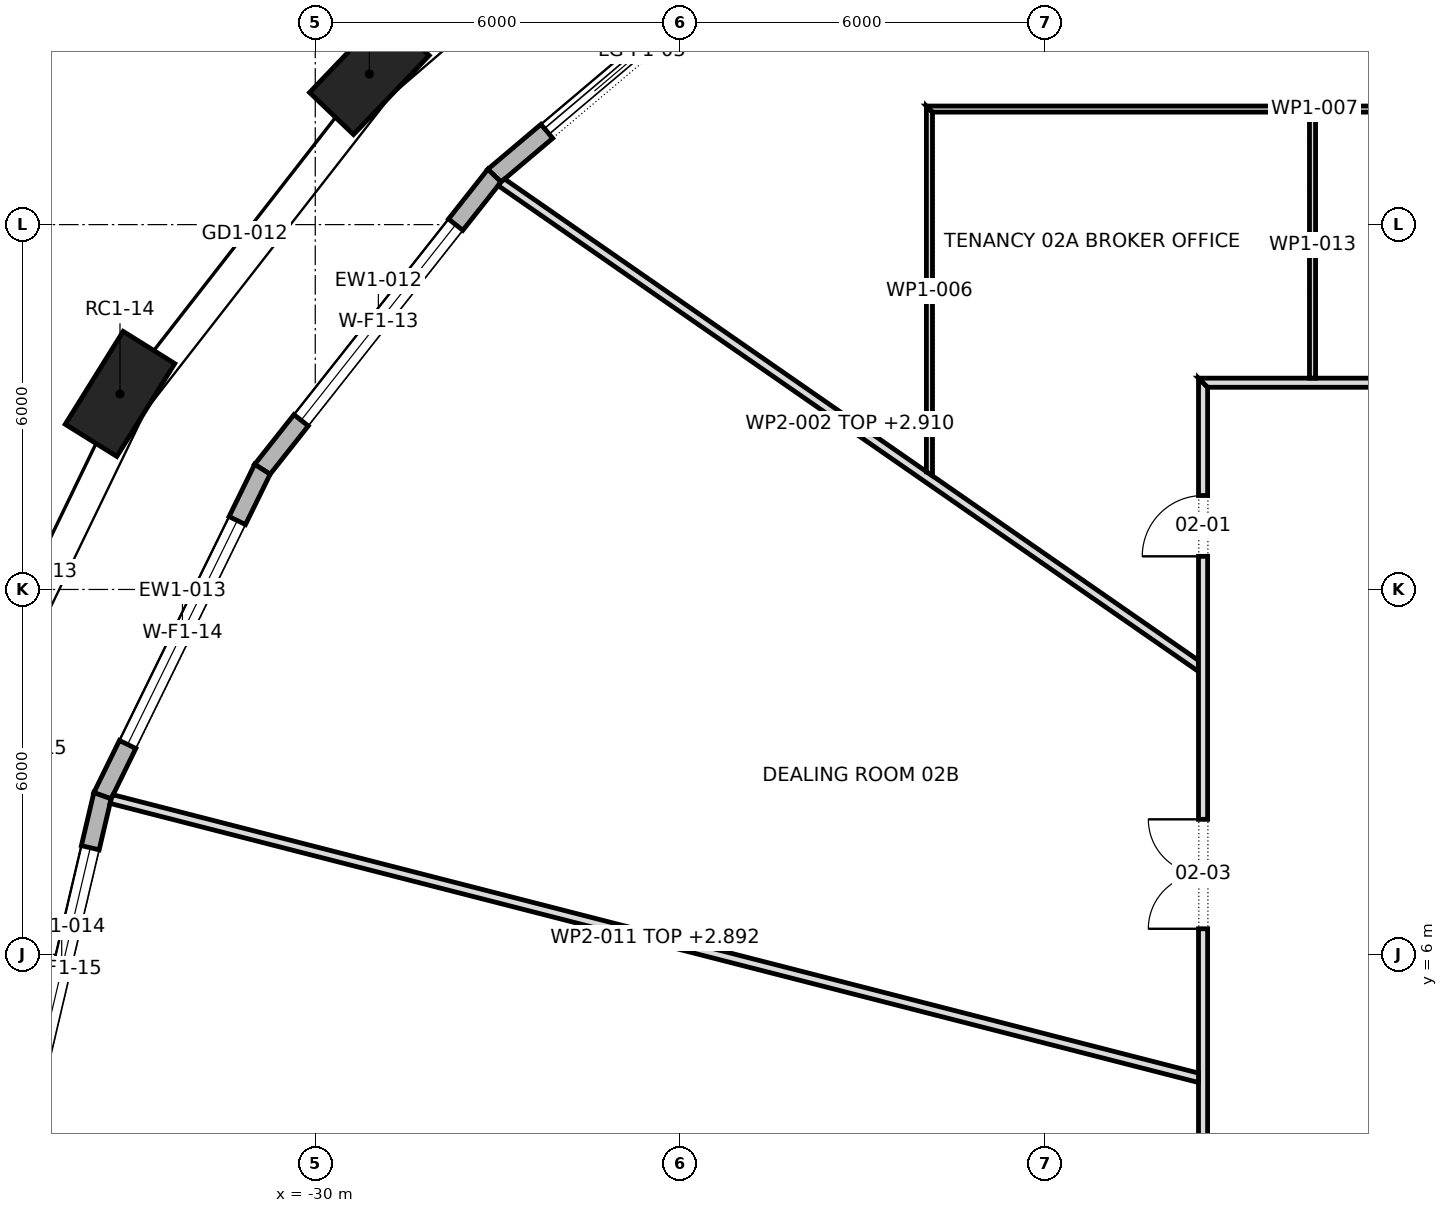
"""IFC4 building model, lengths in metres.
Left out: names, types, materials, properties, quantities, classifications, styles, units other than length and angle.
Written with IfcOpenShell. Run it as: python <this file> out.ifc"""

import sys

from ifc_helpers import new_model, si_unit, direction, frame, frame_2d, origin, origin_2d, place, context, subcontext, project, spatial, polyline, rectangle, outline, extrude, element, fill, save


model = new_model("IFC4")
c1 = context("Model", 3, precision=1e-05, world=origin(), true_north=direction((0.0, 1.0)))
c2 = subcontext(c1, "Body", "Model", "MODEL_VIEW")
j1 = project(units=[si_unit("LENGTHUNIT", "METRE"), si_unit("PLANEANGLEUNIT", "RADIAN")], contexts=[c1])
p1 = place(None, origin())
s1 = spatial("IfcSite", under=j1, at=p1, CompositionType="ELEMENT")
p2 = place(p1, origin())
s2 = spatial("IfcBuilding", under=s1, at=p2, CompositionType="ELEMENT")
p3 = place(p2, frame((0.0, 0.0, 36.1)))
s3 = spatial("IfcBuildingStorey", under=s2, at=p3, CompositionType="ELEMENT", Elevation=36.1)
for number, where, z_axis, x_axis in (
    (1, (-29.11, 20.477, 0.0), (0.0, 0.0, 1.0), (-0.692, -0.722, 0.0)),
    (2, (-33.211, 15.216, 0.0), (0.0, 0.0, 1.0), (-0.529, -0.849, 0.0)),
):
    element("IfcColumn", number, at=place(p3, frame(where, z_axis=z_axis, x_axis=x_axis)), inside=s3, PredefinedType="COLUMN", context=c2, shape_type="SweptSolid", body=[
        extrude(rectangle(XDim=1.8, YDim=1.0, at=origin_2d()), origin(), (0.0, 0.0, 1.0), 4.2),
    ])
p4 = place(p3, frame((-22.2, 22.911, 0.0), z_axis=(0.0, 0.0, 1.0), x_axis=(-0.763577077796, -0.645716691951, 0.0)))
e3 = element("IfcWall", 3, at=p4, inside=s3, PredefinedType="STANDARD", context=c2, shape_type="SweptSolid", body=[
    extrude(outline(polyline([(-0.014, -0.15), (6.372, -0.15), (6.342, 0.15), (0.014, 0.15), (-0.014, -0.15)])), origin(), (0.0, 0.0, 1.0), 3.9),
])
p5 = place(p4, frame((1.129, 0.0, 0.0)))
e4 = element("IfcOpeningElement", 4, at=p5, cuts=e3, PredefinedType="OPENING", context=c2, shape_type="SweptSolid", body=[
    extrude(rectangle(XDim=4.1, YDim=3.45, at=frame_2d((2.05, 1.725))), frame((0.0, 0.162, 0.0), z_axis=(0.0, -1.0, 0.0), x_axis=(1.0, 0.0, 0.0)), (0.0, 0.0, 1.0), 0.324),
])
p6 = place(p3, frame((-27.054, 18.806, 0.0), z_axis=(0.0, 0.0, 1.0), x_axis=(-0.61992334328, -0.784662378642, 0.0)))
e5 = element("IfcWall", 5, at=p6, inside=s3, PredefinedType="STANDARD", context=c2, shape_type="SweptSolid", body=[
    extrude(outline(polyline([(-0.015, -0.15), (6.171, -0.15), (6.139, 0.15), (0.015, 0.15), (-0.015, -0.15)])), origin(), (0.0, 0.0, 1.0), 3.9),
])
p7 = place(p6, frame((1.027, 0.0, 0.6)))
e6 = element("IfcOpeningElement", 6, at=p7, cuts=e5, PredefinedType="OPENING", context=c2, shape_type="SweptSolid", body=[
    extrude(rectangle(XDim=4.1, YDim=2.85, at=frame_2d((2.05, 1.425))), frame((0.0, 0.162, 0.0), z_axis=(0.0, -1.0, 0.0), x_axis=(1.0, 0.0, 0.0)), (0.0, 0.0, 1.0), 0.324),
])
p8 = place(p3, frame((-30.869, 13.976, 0.0), z_axis=(0.0, 0.0, 1.0), x_axis=(-0.439896354052, -0.898048549741, 0.0)))
e7 = element("IfcWall", 7, at=p8, inside=s3, PredefinedType="STANDARD", context=c2, shape_type="SweptSolid", body=[
    extrude(outline(polyline([(-0.016, -0.15), (5.995, -0.15), (5.961, 0.15), (0.016, 0.15), (-0.016, -0.15)])), origin(), (0.0, 0.0, 1.0), 3.9),
])
p9 = place(p8, frame((0.939, 0.0, 0.6)))
e8 = element("IfcOpeningElement", 8, at=p9, cuts=e7, PredefinedType="OPENING", context=c2, shape_type="SweptSolid", body=[
    extrude(rectangle(XDim=4.1, YDim=2.85, at=frame_2d((2.05, 1.425))), frame((0.0, 0.162, 0.0), z_axis=(0.0, -1.0, 0.0), x_axis=(1.0, 0.0, 0.0)), (0.0, 0.0, 1.0), 0.324),
])
p10 = place(p3, frame((-33.499, 8.608, 0.0), z_axis=(0.0, 0.0, 1.0), x_axis=(-0.228976600496, -0.97343192696, 0.0)))
e9 = element("IfcWall", 9, at=p10, inside=s3, PredefinedType="STANDARD", context=c2, shape_type="SweptSolid", body=[
    extrude(outline(polyline([(-0.017, -0.15), (5.874, -0.15), (5.839, 0.15), (0.017, 0.15), (-0.017, -0.15)])), origin(), (0.0, 0.0, 1.0), 3.9),
])
p11 = place(p10, frame((0.878, 0.0, 0.6)))
e10 = element("IfcOpeningElement", 10, at=p11, cuts=e9, PredefinedType="OPENING", context=c2, shape_type="SweptSolid", body=[
    extrude(rectangle(XDim=4.1, YDim=2.85, at=frame_2d((2.05, 1.425))), frame((0.0, 0.162, 0.0), z_axis=(0.0, -1.0, 0.0), x_axis=(1.0, 0.0, 0.0)), (0.0, 0.0, 1.0), 0.324),
])
p12 = place(p3, frame((-26.949, 18.703, 0.0), z_axis=(0.0, 0.0, 1.0), x_axis=(0.821614916445, -0.570042918626, 0.0)))
e11 = element("IfcWall", 11, at=p12, inside=s3, PredefinedType="PARTITIONING", context=c2, shape_type="SweptSolid", body=[
    extrude(outline(polyline([(14.017, -0.075), (14.017, -0.074), (13.967, -0.002), (13.967, -0.002), (13.914, 0.075), (12.1, 0.075), (10.286, 0.075), (8.472, 0.075), (8.469, 0.073), (8.467, 0.075), (6.779, 0.075), (5.09, 0.075), (3.402, 0.075), (1.713, 0.075), (0.024, 0.075), (0.004, 0.0), (0.0, -0.071), (0.0, -0.075), (1.752, -0.075), (3.504, -0.075), (5.257, -0.075), (7.009, -0.075), (8.761, -0.075), (10.513, -0.075), (12.265, -0.075), (14.017, -0.075)])), origin(), (0.0, 0.0, 1.0), 2.91),
])
p13 = place(p3, frame((-19.9, 13.869, 0.0), z_axis=(0.0, 0.0, 1.0), x_axis=(0.0, 1.0, 0.0)))
e12 = element("IfcWall", 12, at=p13, inside=s3, PredefinedType="PARTITIONING", context=c2, shape_type="SweptSolid", body=[
    extrude(outline(polyline([(0.0, -0.05), (1.994, -0.05), (3.987, -0.05), (5.981, -0.05), (5.981, -0.05), (6.081, 0.05), (4.578, 0.05), (3.075, 0.05), (1.572, 0.05), (0.069, 0.05), (0.0, -0.05), (0.0, -0.05)])), origin(), (0.0, 0.0, 1.0), 3.9),
])
p14 = place(p3, frame((-19.95, 19.9, 0.0), z_axis=(0.0, 0.0, 1.0), x_axis=(1.0, 0.0, 0.0)))
e13 = element("IfcWall", 13, at=p14, inside=s3, PredefinedType="PARTITIONING", context=c2, shape_type="SweptSolid", body=[
    extrude(outline(polyline([(12.718, 0.05), (10.901, 0.05), (9.084, 0.05), (7.267, 0.05), (5.45, 0.05), (3.634, 0.05), (1.817, 0.05), (0.0, 0.05), (0.1, -0.05), (1.903, -0.05), (3.705, -0.05), (5.508, -0.05), (7.31, -0.05), (9.113, -0.05), (10.915, -0.05), (12.718, -0.05), (12.718, 0.05)])), origin(), (0.0, 0.0, 1.0), 3.9),
])
p15 = place(p14, frame((9.13, 0.0, 0.0)))
e14 = element("IfcOpeningElement", 14, at=p15, cuts=e13, PredefinedType="OPENING", context=c2, shape_type="SweptSolid", body=[
    extrude(rectangle(XDim=0.9, YDim=2.1, at=frame_2d((0.45, 1.05))), frame((0.0, 0.062, 0.0), z_axis=(0.0, -1.0, 0.0), x_axis=(1.0, 0.0, 0.0)), (0.0, 0.0, 1.0), 0.124),
])
p16 = place(p3, frame((-15.4, -15.475, 0.0), z_axis=(0.0, 0.0, 1.0), x_axis=(0.0, 1.0, 0.0)))
e15 = element("IfcWall", 15, at=p16, inside=s3, PredefinedType="PARTITIONING", context=c2, shape_type="SweptSolid", body=[
    extrude(outline(polyline([(0.15, -0.075), (2.066, -0.075), (3.981, -0.075), (5.897, -0.075), (7.812, -0.075), (9.728, -0.075), (11.644, -0.075), (13.56, -0.075), (15.475, -0.075), (17.391, -0.075), (19.306, -0.075), (21.222, -0.075), (23.138, -0.075), (25.053, -0.075), (26.969, -0.075), (28.885, -0.075), (30.8, -0.075), (30.95, 0.075), (29.016, 0.075), (27.081, 0.075), (25.147, 0.075), (23.212, 0.075), (21.278, 0.075), (19.344, 0.075), (17.409, 0.075), (15.475, 0.075), (13.541, 0.075), (11.606, 0.075), (9.672, 0.075), (7.738, 0.075), (5.803, 0.075), (3.869, 0.075), (1.935, 0.075), (0.0, 0.075), (0.15, -0.075)])), origin(), (0.0, 0.0, 1.0), 3.9),
])
p17 = place(p16, frame((28.02, 0.0, 0.0)))
e16 = element("IfcOpeningElement", 16, at=p17, cuts=e15, PredefinedType="OPENING", context=c2, shape_type="SweptSolid", body=[
    extrude(rectangle(XDim=1.0, YDim=2.1, at=frame_2d((0.5, 1.05))), frame((0.0, 0.087, 0.0), z_axis=(0.0, -1.0, 0.0), x_axis=(1.0, 0.0, 0.0)), (0.0, 0.0, 1.0), 0.174),
])
p18 = place(p16, frame((21.895, 0.0, 0.0)))
e17 = element("IfcOpeningElement", 17, at=p18, cuts=e15, PredefinedType="OPENING", context=c2, shape_type="SweptSolid", body=[
    extrude(rectangle(XDim=1.8, YDim=2.1, at=frame_2d((0.9, 1.05))), frame((0.0, 0.087, 0.0), z_axis=(0.0, -1.0, 0.0), x_axis=(1.0, 0.0, 0.0)), (0.0, 0.0, 1.0), 0.174),
])
p19 = place(p16, frame((15.798, 0.0, 0.0)))
e18 = element("IfcOpeningElement", 18, at=p19, cuts=e15, PredefinedType="OPENING", context=c2, shape_type="SweptSolid", body=[
    extrude(rectangle(XDim=1.8, YDim=2.1, at=frame_2d((0.9, 1.05))), frame((0.0, 0.087, 0.0), z_axis=(0.0, -1.0, 0.0), x_axis=(1.0, 0.0, 0.0)), (0.0, 0.0, 1.0), 0.174),
])
p20 = place(p16, frame((10.343, 0.0, 0.0)))
e19 = element("IfcOpeningElement", 19, at=p20, cuts=e15, PredefinedType="OPENING", context=c2, shape_type="SweptSolid", body=[
    extrude(rectangle(XDim=1.8, YDim=2.1, at=frame_2d((0.9, 1.05))), frame((0.0, 0.087, 0.0), z_axis=(0.0, -1.0, 0.0), x_axis=(1.0, 0.0, 0.0)), (0.0, 0.0, 1.0), 0.174),
])
p21 = place(p16, frame((3.795, 0.0, 0.0)))
e20 = element("IfcOpeningElement", 20, at=p21, cuts=e15, PredefinedType="OPENING", context=c2, shape_type="SweptSolid", body=[
    extrude(rectangle(XDim=1.0, YDim=2.1, at=frame_2d((0.5, 1.05))), frame((0.0, 0.087, 0.0), z_axis=(0.0, -1.0, 0.0), x_axis=(1.0, 0.0, 0.0)), (0.0, 0.0, 1.0), 0.174),
])
p22 = place(p3, frame((-15.457, 3.965, 0.0), z_axis=(0.0, 0.0, 1.0), x_axis=(-0.968658160146, 0.248397602209, 0.0)))
e21 = element("IfcWall", 21, at=p22, inside=s3, PredefinedType="PARTITIONING", context=c2, shape_type="SweptSolid", body=[
    extrude(outline(polyline([(0.038, -0.075), (1.881, -0.075), (3.723, -0.075), (5.566, -0.075), (7.409, -0.075), (9.251, -0.075), (11.094, -0.075), (12.937, -0.075), (14.779, -0.075), (16.622, -0.075), (18.465, -0.075), (18.478, -0.012), (18.478, 0.075), (16.63, 0.075), (14.782, 0.075), (12.935, 0.075), (11.087, 0.075), (9.239, 0.075), (7.391, 0.075), (5.543, 0.075), (3.696, 0.075), (1.848, 0.075), (0.0, 0.075), (0.0, 0.073), (0.038, -0.075)])), origin(), (0.0, 0.0, 1.0), 2.892),
])
p23 = place(p3, frame((-15.475, 15.4, 0.0), z_axis=(0.0, 0.0, 1.0), x_axis=(1.0, 0.0, 0.0)))
e22 = element("IfcWall", 22, at=p23, inside=s3, PredefinedType="PARTITIONING", context=c2, shape_type="SweptSolid", body=[
    extrude(outline(polyline([(0.15, -0.075), (2.066, -0.075), (3.981, -0.075), (5.897, -0.075), (7.812, -0.075), (9.728, -0.075), (11.644, -0.075), (13.56, -0.075), (15.475, -0.075), (17.391, -0.075), (19.306, -0.075), (21.222, -0.075), (23.138, -0.075), (25.053, -0.075), (26.969, -0.075), (28.885, -0.075), (30.8, -0.075), (30.95, 0.075), (29.016, 0.075), (27.081, 0.075), (25.147, 0.075), (23.212, 0.075), (21.278, 0.075), (19.344, 0.075), (17.409, 0.075), (15.475, 0.075), (13.541, 0.075), (11.606, 0.075), (9.672, 0.075), (7.738, 0.075), (5.803, 0.075), (3.869, 0.075), (1.935, 0.075), (0.0, 0.075), (0.15, -0.075)])), origin(), (0.0, 0.0, 1.0), 3.9),
])
p24 = place(p23, frame((5.415, 0.0, 0.0)))
e23 = element("IfcOpeningElement", 23, at=p24, cuts=e22, PredefinedType="OPENING", context=c2, shape_type="SweptSolid", body=[
    extrude(rectangle(XDim=1.0, YDim=2.1, at=frame_2d((0.5, 1.05))), frame((0.0, 0.087, 0.0), z_axis=(0.0, -1.0, 0.0), x_axis=(1.0, 0.0, 0.0)), (0.0, 0.0, 1.0), 0.174),
])
p25 = place(p23, frame((25.435, 0.0, 0.0)))
e24 = element("IfcOpeningElement", 24, at=p25, cuts=e22, PredefinedType="OPENING", context=c2, shape_type="SweptSolid", body=[
    extrude(rectangle(XDim=1.0, YDim=2.1, at=frame_2d((0.5, 1.05))), frame((0.0, 0.087, 0.0), z_axis=(0.0, -1.0, 0.0), x_axis=(1.0, 0.0, 0.0)), (0.0, 0.0, 1.0), 0.174),
])
p26 = place(p23, frame((14.975, 0.0, 0.0)))
e25 = element("IfcOpeningElement", 25, at=p26, cuts=e22, PredefinedType="OPENING", context=c2, shape_type="SweptSolid", body=[
    extrude(rectangle(XDim=1.0, YDim=2.1, at=frame_2d((0.5, 1.05))), frame((0.0, 0.087, 0.0), z_axis=(0.0, -1.0, 0.0), x_axis=(1.0, 0.0, 0.0)), (0.0, 0.0, 1.0), 0.174),
])
p27 = place(p3, frame((-13.6, 19.85, 0.0), z_axis=(0.0, 0.0, 1.0), x_axis=(0.0, -1.0, 0.0)))
e26 = element("IfcWall", 26, at=p27, inside=s3, PredefinedType="PARTITIONING", context=c2, shape_type="SweptSolid", body=[
    extrude(rectangle(XDim=4.375, YDim=0.1, at=frame_2d((2.188, 0.0))), origin(), (0.0, 0.0, 1.0), 3.9),
])
p28 = place(p5, origin())
e27 = element("IfcDoor", 27, at=p28, inside=s3, OperationType="DOUBLE_DOOR_SLIDING", PredefinedType="DOOR", context=c2, shape_type="SweptSolid", body=[
    extrude(rectangle(XDim=4.1, YDim=3.45, at=frame_2d((2.05, 1.725))), frame((0.0, 0.025, 0.0), z_axis=(0.0, -1.0, 0.0), x_axis=(1.0, 0.0, 0.0)), (0.0, 0.0, 1.0), 0.05),
])
fill(e4, e27)
p29 = place(p7, origin())
e28 = element("IfcWindow", 28, at=p29, inside=s3, PartitioningType="TRIPLE_PANEL_VERTICAL", PredefinedType="WINDOW", context=c2, shape_type="SweptSolid", body=[
    extrude(rectangle(XDim=4.1, YDim=2.85, at=frame_2d((2.05, 1.425))), frame((0.0, 0.03, 0.0), z_axis=(0.0, -1.0, 0.0), x_axis=(1.0, 0.0, 0.0)), (0.0, 0.0, 1.0), 0.06),
])
fill(e6, e28)
p30 = place(p9, origin())
e29 = element("IfcWindow", 29, at=p30, inside=s3, PartitioningType="TRIPLE_PANEL_VERTICAL", PredefinedType="WINDOW", context=c2, shape_type="SweptSolid", body=[
    extrude(rectangle(XDim=4.1, YDim=2.85, at=frame_2d((2.05, 1.425))), frame((0.0, 0.03, 0.0), z_axis=(0.0, -1.0, 0.0), x_axis=(1.0, 0.0, 0.0)), (0.0, 0.0, 1.0), 0.06),
])
fill(e8, e29)
p31 = place(p11, origin())
e30 = element("IfcWindow", 30, at=p31, inside=s3, PartitioningType="TRIPLE_PANEL_VERTICAL", PredefinedType="WINDOW", context=c2, shape_type="SweptSolid", body=[
    extrude(rectangle(XDim=4.1, YDim=2.85, at=frame_2d((2.05, 1.425))), frame((0.0, 0.03, 0.0), z_axis=(0.0, -1.0, 0.0), x_axis=(1.0, 0.0, 0.0)), (0.0, 0.0, 1.0), 0.06),
])
fill(e10, e30)
p32 = place(p17, origin())
e31 = element("IfcDoor", 31, at=p32, inside=s3, OperationType="SINGLE_SWING_RIGHT", PredefinedType="DOOR", context=c2, shape_type="SweptSolid", body=[
    extrude(rectangle(XDim=1.0, YDim=2.1, at=frame_2d((0.5, 1.05))), frame((0.0, 0.025, 0.0), z_axis=(0.0, -1.0, 0.0), x_axis=(1.0, 0.0, 0.0)), (0.0, 0.0, 1.0), 0.05),
])
fill(e16, e31)
p33 = place(p18, origin())
e32 = element("IfcDoor", 32, at=p33, inside=s3, OperationType="DOUBLE_DOOR_SINGLE_SWING", PredefinedType="DOOR", context=c2, shape_type="SweptSolid", body=[
    extrude(rectangle(XDim=1.8, YDim=2.1, at=frame_2d((0.9, 1.05))), frame((0.0, 0.025, 0.0), z_axis=(0.0, -1.0, 0.0), x_axis=(1.0, 0.0, 0.0)), (0.0, 0.0, 1.0), 0.05),
])
fill(e17, e32)
save(model, sys.argv[1])
